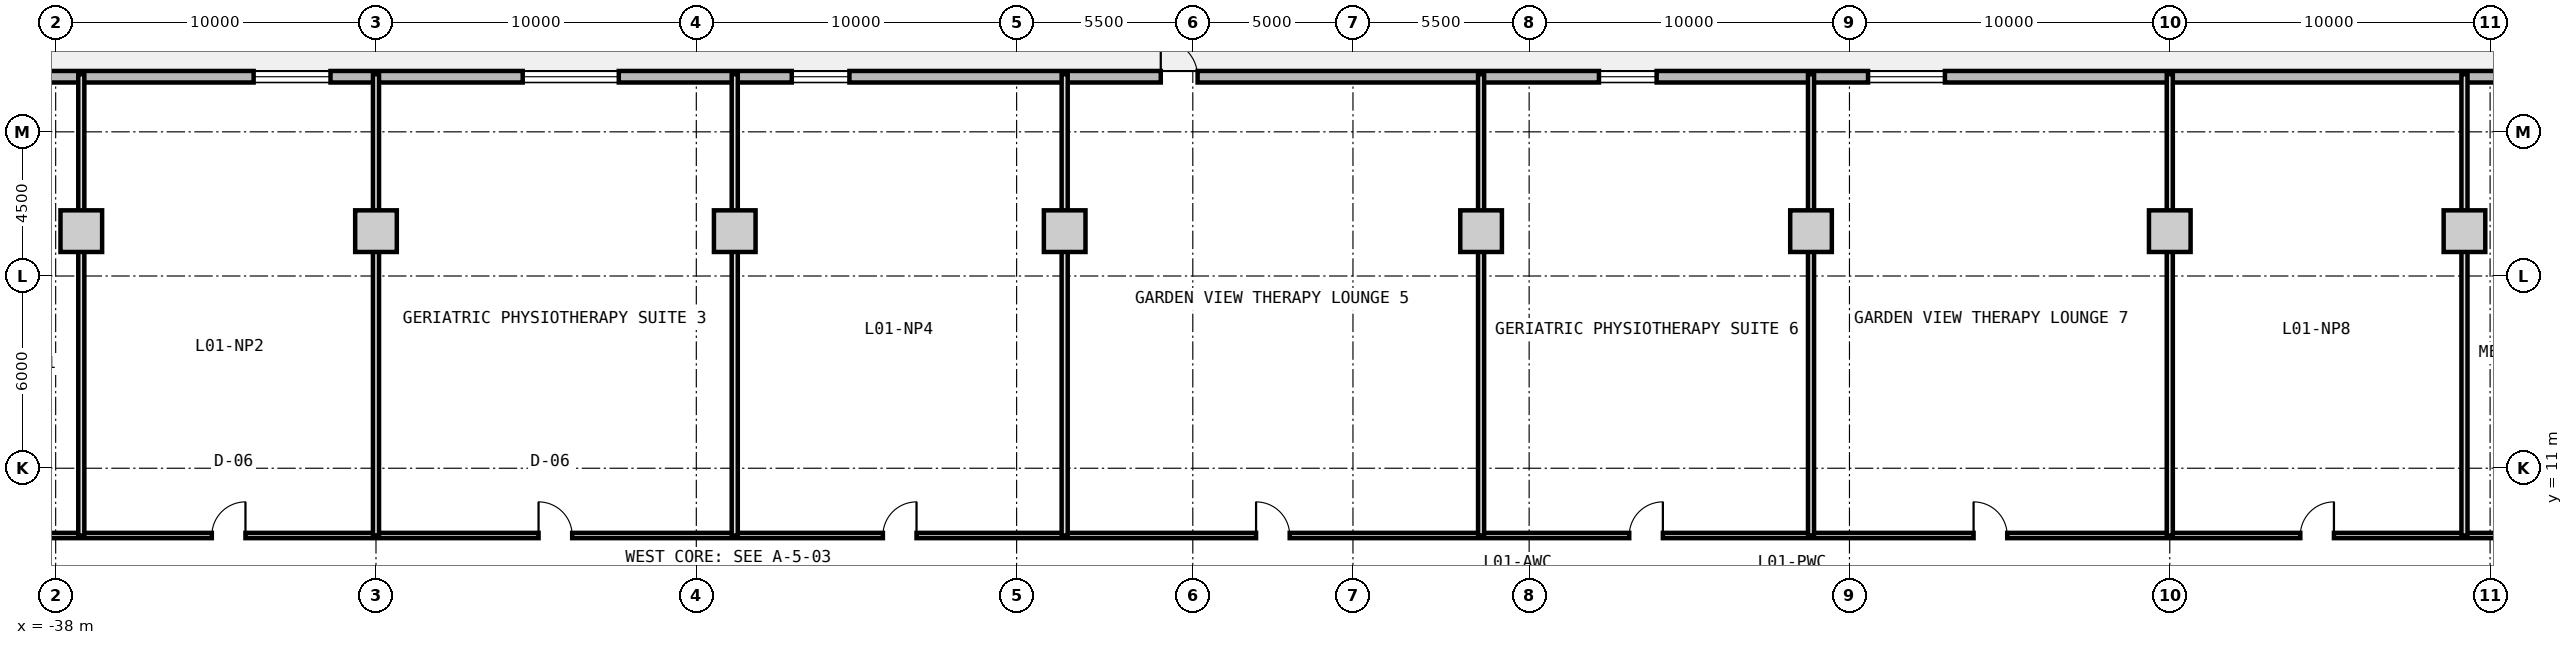
"""IFC4 building model, lengths in metres.
Left out: names, types, materials, properties, quantities, classifications, styles, units other than length and angle.
Written with IfcOpenShell. Run it as: python <this file> out.ifc"""

import sys

from ifc_helpers import new_model, si_unit, direction, frame, frame_2d, origin, origin_2d, place, context, subcontext, project, spatial, rectangle, extrude, source, transform, mapped, element, fill, save


model = new_model("IFC4")
c1 = context("Model", 3, precision=1e-05, world=origin(), true_north=direction((0.0, 1.0)))
c2 = subcontext(c1, "Body", "Model", "MODEL_VIEW")
j1 = project(units=[si_unit("LENGTHUNIT", "METRE"), si_unit("PLANEANGLEUNIT", "RADIAN")], contexts=[c1])
p1 = place(None, origin())
s1 = spatial("IfcSite", under=j1, at=p1, CompositionType="ELEMENT")
p2 = place(p1, origin())
s2 = spatial("IfcBuilding", under=s1, at=p2, CompositionType="ELEMENT")
p3 = place(p2, frame((0.0, 0.0, 4.2)))
s3 = spatial("IfcBuildingStorey", under=s2, at=p3, CompositionType="ELEMENT", Elevation=4.2)
m1 = source(origin(), c2, "Body", "SweptSolid", [
    extrude(rectangle(XDim=1.3, YDim=1.3, at=origin_2d()), origin(), (0.0, 0.0, 1.0), 4.2),
])
for number, where, z_axis, x_axis in (
    (1, (-37.2, 18.4, 0.0), (0.0, 0.0, 1.0), (1.0, 0.0, 0.0)),
    (2, (-28.0, 18.4, 0.0), (0.0, 0.0, 1.0), (1.0, 0.0, 0.0)),
    (3, (-16.8, 18.4, 0.0), (0.0, 0.0, 1.0), (1.0, 0.0, 0.0)),
    (4, (-6.5, 18.4, 0.0), (0.0, 0.0, 1.0), (1.0, 0.0, 0.0)),
    (5, (6.5, 18.4, 0.0), (0.0, 0.0, 1.0), (1.0, 0.0, 0.0)),
    (6, (16.8, 18.4, 0.0), (0.0, 0.0, 1.0), (1.0, 0.0, 0.0)),
    (7, (28.0, 18.4, 0.0), (0.0, 0.0, 1.0), (1.0, 0.0, 0.0)),
    (8, (37.2, 18.4, 0.0), (0.0, 0.0, 1.0), (1.0, 0.0, 0.0)),
):
    element("IfcColumn", number, at=place(p3, frame(where, z_axis=z_axis, x_axis=x_axis)), inside=s3, PredefinedType="COLUMN", context=c2, shape_type="MappedRepresentation", body=[
        mapped(m1, transform((0.0, 0.0, 0.0), x_axis=(1.0, 0.0, 0.0), y_axis=(0.0, 1.0, 0.0), z_axis=(0.0, 0.0, 1.0), scale=1.0)),
    ])
m2 = source(origin(), c2, "Body", "SweptSolid", [
    extrude(rectangle(XDim=105.24, YDim=0.36, at=frame_2d((52.62, 0.0))), origin(), (0.0, 0.0, 1.0), 3.88),
])
p4 = place(p3, frame((-52.62, 23.22, 0.0), z_axis=(0.0, 0.0, 1.0), x_axis=(1.0, 0.0, 0.0)))
e9 = element("IfcWall", 9, at=p4, inside=s3, PredefinedType="SOLIDWALL", context=c2, shape_type="MappedRepresentation", body=[
    mapped(m2, transform((0.0, 0.0, 0.0), x_axis=(1.0, 0.0, 0.0), y_axis=(0.0, 1.0, 0.0), z_axis=(0.0, 0.0, 1.0), scale=1.0)),
])
p5 = place(p4, frame((49.12, 0.0, 0.0)))
e10 = element("IfcOpeningElement", 10, at=p5, cuts=e9, PredefinedType="OPENING", context=c2, shape_type="SweptSolid", body=[
    extrude(rectangle(XDim=1.15, YDim=2.25, at=frame_2d((0.575, 1.125))), frame((0.0, 0.19, 0.0), z_axis=(0.0, -1.0, 0.0), x_axis=(1.0, 0.0, 0.0)), (0.0, 0.0, 1.0), 0.38),
])
p6 = place(p4, frame((4.0, 0.0, 0.85)))
e11 = element("IfcOpeningElement", 11, at=p6, cuts=e9, PredefinedType="OPENING", context=c2, shape_type="SweptSolid", body=[
    extrude(rectangle(XDim=3.0, YDim=2.1, at=frame_2d((1.5, 1.05))), frame((0.0, 0.19, 0.0), z_axis=(0.0, -1.0, 0.0), x_axis=(1.0, 0.0, 0.0)), (0.0, 0.0, 1.0), 0.38),
])
p7 = place(p4, frame((12.4, 0.0, 0.9)))
e12 = element("IfcOpeningElement", 12, at=p7, cuts=e9, PredefinedType="OPENING", context=c2, shape_type="SweptSolid", body=[
    extrude(rectangle(XDim=1.8, YDim=2.0, at=frame_2d((0.9, 1.0))), frame((0.0, 0.19, 0.0), z_axis=(0.0, -1.0, 0.0), x_axis=(1.0, 0.0, 0.0)), (0.0, 0.0, 1.0), 0.38),
])
p8 = place(p4, frame((20.8, 0.0, 0.85)))
e13 = element("IfcOpeningElement", 13, at=p8, cuts=e9, PredefinedType="OPENING", context=c2, shape_type="SweptSolid", body=[
    extrude(rectangle(XDim=2.4, YDim=2.2, at=frame_2d((1.2, 1.1))), frame((0.0, 0.19, 0.0), z_axis=(0.0, -1.0, 0.0), x_axis=(1.0, 0.0, 0.0)), (0.0, 0.0, 1.0), 0.38),
])
p9 = place(p4, frame((29.2, 0.0, 0.85)))
e14 = element("IfcOpeningElement", 14, at=p9, cuts=e9, PredefinedType="OPENING", context=c2, shape_type="SweptSolid", body=[
    extrude(rectangle(XDim=3.0, YDim=2.1, at=frame_2d((1.5, 1.05))), frame((0.0, 0.19, 0.0), z_axis=(0.0, -1.0, 0.0), x_axis=(1.0, 0.0, 0.0)), (0.0, 0.0, 1.0), 0.38),
])
p10 = place(p4, frame((37.6, 0.0, 0.9)))
e15 = element("IfcOpeningElement", 15, at=p10, cuts=e9, PredefinedType="OPENING", context=c2, shape_type="SweptSolid", body=[
    extrude(rectangle(XDim=1.8, YDim=2.0, at=frame_2d((0.9, 1.0))), frame((0.0, 0.19, 0.0), z_axis=(0.0, -1.0, 0.0), x_axis=(1.0, 0.0, 0.0)), (0.0, 0.0, 1.0), 0.38),
])
p11 = place(p4, frame((62.8, 0.0, 0.9)))
e16 = element("IfcOpeningElement", 16, at=p11, cuts=e9, PredefinedType="OPENING", context=c2, shape_type="SweptSolid", body=[
    extrude(rectangle(XDim=1.8, YDim=2.0, at=frame_2d((0.9, 1.0))), frame((0.0, 0.19, 0.0), z_axis=(0.0, -1.0, 0.0), x_axis=(1.0, 0.0, 0.0)), (0.0, 0.0, 1.0), 0.38),
])
p12 = place(p4, frame((71.2, 0.0, 0.85)))
e17 = element("IfcOpeningElement", 17, at=p12, cuts=e9, PredefinedType="OPENING", context=c2, shape_type="SweptSolid", body=[
    extrude(rectangle(XDim=2.4, YDim=2.2, at=frame_2d((1.2, 1.1))), frame((0.0, 0.19, 0.0), z_axis=(0.0, -1.0, 0.0), x_axis=(1.0, 0.0, 0.0)), (0.0, 0.0, 1.0), 0.38),
])
m3 = source(origin(), c2, "Body", "SweptSolid", [
    extrude(rectangle(XDim=105.3, YDim=0.165, at=frame_2d((52.65, 0.0))), origin(), (0.0, 0.0, 1.0), 3.865),
])
p13 = place(p3, frame((-52.65, 8.9, 0.0), z_axis=(0.0, 0.0, 1.0), x_axis=(1.0, 0.0, 0.0)))
e18 = element("IfcWall", 18, at=p13, inside=s3, PredefinedType="PARTITIONING", context=c2, shape_type="MappedRepresentation", body=[
    mapped(m3, transform((0.0, 0.0, 0.0), x_axis=(1.0, 0.0, 0.0), y_axis=(0.0, 1.0, 0.0), z_axis=(0.0, 0.0, 1.0), scale=1.0)),
])
p14 = place(p13, frame((7.325, 0.0, 0.0)))
e19 = element("IfcOpeningElement", 19, at=p14, cuts=e18, PredefinedType="OPENING", context=c2, shape_type="SweptSolid", body=[
    extrude(rectangle(XDim=1.05, YDim=2.15, at=frame_2d((0.525, 1.075))), frame((0.0, 0.093, 0.0), z_axis=(0.0, -1.0, 0.0), x_axis=(1.0, 0.0, 0.0)), (0.0, 0.0, 1.0), 0.185),
])
p15 = place(p13, frame((19.525, 0.0, 0.0)))
e20 = element("IfcOpeningElement", 20, at=p15, cuts=e18, PredefinedType="OPENING", context=c2, shape_type="SweptSolid", body=[
    extrude(rectangle(XDim=1.05, YDim=2.15, at=frame_2d((0.525, 1.075))), frame((0.0, 0.093, 0.0), z_axis=(0.0, -1.0, 0.0), x_axis=(1.0, 0.0, 0.0)), (0.0, 0.0, 1.0), 0.185),
])
p16 = place(p13, frame((29.725, 0.0, 0.0)))
e21 = element("IfcOpeningElement", 21, at=p16, cuts=e18, PredefinedType="OPENING", context=c2, shape_type="SweptSolid", body=[
    extrude(rectangle(XDim=1.05, YDim=2.15, at=frame_2d((0.525, 1.075))), frame((0.0, 0.093, 0.0), z_axis=(0.0, -1.0, 0.0), x_axis=(1.0, 0.0, 0.0)), (0.0, 0.0, 1.0), 0.185),
])
p17 = place(p13, frame((40.475, 0.0, 0.0)))
e22 = element("IfcOpeningElement", 22, at=p17, cuts=e18, PredefinedType="OPENING", context=c2, shape_type="SweptSolid", body=[
    extrude(rectangle(XDim=1.05, YDim=2.15, at=frame_2d((0.525, 1.075))), frame((0.0, 0.093, 0.0), z_axis=(0.0, -1.0, 0.0), x_axis=(1.0, 0.0, 0.0)), (0.0, 0.0, 1.0), 0.185),
])
p18 = place(p13, frame((52.125, 0.0, 0.0)))
e23 = element("IfcOpeningElement", 23, at=p18, cuts=e18, PredefinedType="OPENING", context=c2, shape_type="SweptSolid", body=[
    extrude(rectangle(XDim=1.05, YDim=2.15, at=frame_2d((0.525, 1.075))), frame((0.0, 0.093, 0.0), z_axis=(0.0, -1.0, 0.0), x_axis=(1.0, 0.0, 0.0)), (0.0, 0.0, 1.0), 0.185),
])
p19 = place(p13, frame((63.775, 0.0, 0.0)))
e24 = element("IfcOpeningElement", 24, at=p19, cuts=e18, PredefinedType="OPENING", context=c2, shape_type="SweptSolid", body=[
    extrude(rectangle(XDim=1.05, YDim=2.15, at=frame_2d((0.525, 1.075))), frame((0.0, 0.093, 0.0), z_axis=(0.0, -1.0, 0.0), x_axis=(1.0, 0.0, 0.0)), (0.0, 0.0, 1.0), 0.185),
])
p20 = place(p13, frame((74.525, 0.0, 0.0)))
e25 = element("IfcOpeningElement", 25, at=p20, cuts=e18, PredefinedType="OPENING", context=c2, shape_type="SweptSolid", body=[
    extrude(rectangle(XDim=1.05, YDim=2.15, at=frame_2d((0.525, 1.075))), frame((0.0, 0.093, 0.0), z_axis=(0.0, -1.0, 0.0), x_axis=(1.0, 0.0, 0.0)), (0.0, 0.0, 1.0), 0.185),
])
p21 = place(p13, frame((84.725, 0.0, 0.0)))
e26 = element("IfcOpeningElement", 26, at=p21, cuts=e18, PredefinedType="OPENING", context=c2, shape_type="SweptSolid", body=[
    extrude(rectangle(XDim=1.05, YDim=2.15, at=frame_2d((0.525, 1.075))), frame((0.0, 0.093, 0.0), z_axis=(0.0, -1.0, 0.0), x_axis=(1.0, 0.0, 0.0)), (0.0, 0.0, 1.0), 0.185),
])
p22 = place(p13, frame((96.925, 0.0, 0.0)))
e27 = element("IfcOpeningElement", 27, at=p22, cuts=e18, PredefinedType="OPENING", context=c2, shape_type="SweptSolid", body=[
    extrude(rectangle(XDim=1.05, YDim=2.15, at=frame_2d((0.525, 1.075))), frame((0.0, 0.093, 0.0), z_axis=(0.0, -1.0, 0.0), x_axis=(1.0, 0.0, 0.0)), (0.0, 0.0, 1.0), 0.185),
])
m4 = source(origin(), c2, "Body", "SweptSolid", [
    extrude(rectangle(XDim=14.4, YDim=0.19, at=frame_2d((7.2, 0.0))), origin(), (0.0, 0.0, 1.0), 3.865),
])
for number, where, z_axis, x_axis in (
    (28, (-37.2, 8.9, 0.0), (0.0, 0.0, 1.0), (0.0, 1.0, 0.0)),
    (29, (-28.0, 8.9, 0.0), (0.0, 0.0, 1.0), (0.0, 1.0, 0.0)),
    (30, (-16.8, 8.9, 0.0), (0.0, 0.0, 1.0), (0.0, 1.0, 0.0)),
):
    element("IfcWall", number, at=place(p3, frame(where, z_axis=z_axis, x_axis=x_axis)), inside=s3, PredefinedType="PARTITIONING", context=c2, shape_type="MappedRepresentation", body=[
        mapped(m4, transform((0.0, 0.0, 0.0), x_axis=(1.0, 0.0, 0.0), y_axis=(0.0, 1.0, 0.0), z_axis=(0.0, 0.0, 1.0), scale=1.0)),
    ])
m5 = source(origin(), c2, "Body", "SweptSolid", [
    extrude(rectangle(XDim=14.4, YDim=0.19, at=frame_2d((7.2, 0.0))), origin(), (0.0, 0.0, 1.0), 3.215),
])
for number, where, z_axis, x_axis in (
    (31, (-6.5, 8.9, 0.0), (0.0, 0.0, 1.0), (0.0, 1.0, 0.0)),
    (32, (6.5, 8.9, 0.0), (0.0, 0.0, 1.0), (0.0, 1.0, 0.0)),
    (33, (16.8, 8.9, 0.0), (0.0, 0.0, 1.0), (0.0, 1.0, 0.0)),
):
    element("IfcWall", number, at=place(p3, frame(where, z_axis=z_axis, x_axis=x_axis)), inside=s3, PredefinedType="PARTITIONING", context=c2, shape_type="MappedRepresentation", body=[
        mapped(m5, transform((0.0, 0.0, 0.0), x_axis=(1.0, 0.0, 0.0), y_axis=(0.0, 1.0, 0.0), z_axis=(0.0, 0.0, 1.0), scale=1.0)),
    ])
for number, where, z_axis, x_axis in (
    (34, (28.0, 8.9, 0.0), (0.0, 0.0, 1.0), (0.0, 1.0, 0.0)),
    (35, (37.2, 8.9, 0.0), (0.0, 0.0, 1.0), (0.0, 1.0, 0.0)),
):
    element("IfcWall", number, at=place(p3, frame(where, z_axis=z_axis, x_axis=x_axis)), inside=s3, PredefinedType="PARTITIONING", context=c2, shape_type="MappedRepresentation", body=[
        mapped(m4, transform((0.0, 0.0, 0.0), x_axis=(1.0, 0.0, 0.0), y_axis=(0.0, 1.0, 0.0), z_axis=(0.0, 0.0, 1.0), scale=1.0)),
    ])
m6 = source(origin(), c2, "Body", "SweptSolid", [
    extrude(rectangle(XDim=1.15, YDim=2.25, at=frame_2d((0.575, 1.125))), frame((0.0, 0.025, 0.0), z_axis=(0.0, -1.0, 0.0), x_axis=(1.0, 0.0, 0.0)), (0.0, 0.0, 1.0), 0.05),
])
p23 = place(p5, origin())
e36 = element("IfcDoor", 36, at=p23, inside=s3, OperationType="SINGLE_SWING_LEFT", PredefinedType="DOOR", context=c2, shape_type="MappedRepresentation", body=[
    mapped(m6, transform((0.0, 0.0, 0.0), x_axis=(1.0, 0.0, 0.0), y_axis=(0.0, 1.0, 0.0), z_axis=(0.0, 0.0, 1.0), scale=1.0)),
])
fill(e10, e36)
m7 = source(origin(), c2, "Body", "SweptSolid", [
    extrude(rectangle(XDim=2.4, YDim=2.2, at=frame_2d((1.2, 1.1))), frame((0.0, 0.03, 0.0), z_axis=(0.0, -1.0, 0.0), x_axis=(1.0, 0.0, 0.0)), (0.0, 0.0, 1.0), 0.06),
])
p24 = place(p8, origin())
e37 = element("IfcWindow", 37, at=p24, inside=s3, PartitioningType="SINGLE_PANEL", PredefinedType="WINDOW", context=c2, shape_type="MappedRepresentation", body=[
    mapped(m7, transform((0.0, 0.0, 0.0), x_axis=(1.0, 0.0, 0.0), y_axis=(0.0, 1.0, 0.0), z_axis=(0.0, 0.0, 1.0), scale=1.0)),
])
fill(e13, e37)
m8 = source(origin(), c2, "Body", "SweptSolid", [
    extrude(rectangle(XDim=3.0, YDim=2.1, at=frame_2d((1.5, 1.05))), frame((0.0, 0.03, 0.0), z_axis=(0.0, -1.0, 0.0), x_axis=(1.0, 0.0, 0.0)), (0.0, 0.0, 1.0), 0.06),
])
p25 = place(p9, origin())
e38 = element("IfcWindow", 38, at=p25, inside=s3, PartitioningType="SINGLE_PANEL", PredefinedType="WINDOW", context=c2, shape_type="MappedRepresentation", body=[
    mapped(m8, transform((0.0, 0.0, 0.0), x_axis=(1.0, 0.0, 0.0), y_axis=(0.0, 1.0, 0.0), z_axis=(0.0, 0.0, 1.0), scale=1.0)),
])
fill(e14, e38)
m9 = source(origin(), c2, "Body", "SweptSolid", [
    extrude(rectangle(XDim=1.8, YDim=2.0, at=frame_2d((0.9, 1.0))), frame((0.0, 0.03, 0.0), z_axis=(0.0, -1.0, 0.0), x_axis=(1.0, 0.0, 0.0)), (0.0, 0.0, 1.0), 0.06),
])
p26 = place(p10, origin())
e39 = element("IfcWindow", 39, at=p26, inside=s3, PartitioningType="SINGLE_PANEL", PredefinedType="WINDOW", context=c2, shape_type="MappedRepresentation", body=[
    mapped(m9, transform((0.0, 0.0, 0.0), x_axis=(1.0, 0.0, 0.0), y_axis=(0.0, 1.0, 0.0), z_axis=(0.0, 0.0, 1.0), scale=1.0)),
])
fill(e15, e39)
p27 = place(p11, origin())
e40 = element("IfcWindow", 40, at=p27, inside=s3, PartitioningType="SINGLE_PANEL", PredefinedType="WINDOW", context=c2, shape_type="MappedRepresentation", body=[
    mapped(m9, transform((0.0, 0.0, 0.0), x_axis=(1.0, 0.0, 0.0), y_axis=(0.0, 1.0, 0.0), z_axis=(0.0, 0.0, 1.0), scale=1.0)),
])
fill(e16, e40)
p28 = place(p12, origin())
e41 = element("IfcWindow", 41, at=p28, inside=s3, PartitioningType="SINGLE_PANEL", PredefinedType="WINDOW", context=c2, shape_type="MappedRepresentation", body=[
    mapped(m7, transform((0.0, 0.0, 0.0), x_axis=(1.0, 0.0, 0.0), y_axis=(0.0, 1.0, 0.0), z_axis=(0.0, 0.0, 1.0), scale=1.0)),
])
fill(e17, e41)
m10 = source(origin(), c2, "Body", "SweptSolid", [
    extrude(rectangle(XDim=1.05, YDim=2.15, at=frame_2d((0.525, 1.075))), frame((0.0, 0.025, 0.0), z_axis=(0.0, -1.0, 0.0), x_axis=(1.0, 0.0, 0.0)), (0.0, 0.0, 1.0), 0.05),
])
p29 = place(p15, origin())
e42 = element("IfcDoor", 42, at=p29, inside=s3, OperationType="SINGLE_SWING_RIGHT", PredefinedType="DOOR", context=c2, shape_type="MappedRepresentation", body=[
    mapped(m10, transform((0.0, 0.0, 0.0), x_axis=(1.0, 0.0, 0.0), y_axis=(0.0, 1.0, 0.0), z_axis=(0.0, 0.0, 1.0), scale=1.0)),
])
fill(e20, e42)
p30 = place(p16, origin())
e43 = element("IfcDoor", 43, at=p30, inside=s3, OperationType="SINGLE_SWING_LEFT", PredefinedType="DOOR", context=c2, shape_type="MappedRepresentation", body=[
    mapped(m10, transform((0.0, 0.0, 0.0), x_axis=(1.0, 0.0, 0.0), y_axis=(0.0, 1.0, 0.0), z_axis=(0.0, 0.0, 1.0), scale=1.0)),
])
fill(e21, e43)
p31 = place(p17, origin())
e44 = element("IfcDoor", 44, at=p31, inside=s3, OperationType="SINGLE_SWING_RIGHT", PredefinedType="DOOR", context=c2, shape_type="MappedRepresentation", body=[
    mapped(m10, transform((0.0, 0.0, 0.0), x_axis=(1.0, 0.0, 0.0), y_axis=(0.0, 1.0, 0.0), z_axis=(0.0, 0.0, 1.0), scale=1.0)),
])
fill(e22, e44)
p32 = place(p18, origin())
e45 = element("IfcDoor", 45, at=p32, inside=s3, OperationType="SINGLE_SWING_LEFT", PredefinedType="DOOR", context=c2, shape_type="MappedRepresentation", body=[
    mapped(m10, transform((0.0, 0.0, 0.0), x_axis=(1.0, 0.0, 0.0), y_axis=(0.0, 1.0, 0.0), z_axis=(0.0, 0.0, 1.0), scale=1.0)),
])
fill(e23, e45)
p33 = place(p19, origin())
e46 = element("IfcDoor", 46, at=p33, inside=s3, OperationType="SINGLE_SWING_RIGHT", PredefinedType="DOOR", context=c2, shape_type="MappedRepresentation", body=[
    mapped(m10, transform((0.0, 0.0, 0.0), x_axis=(1.0, 0.0, 0.0), y_axis=(0.0, 1.0, 0.0), z_axis=(0.0, 0.0, 1.0), scale=1.0)),
])
fill(e24, e46)
p34 = place(p20, origin())
e47 = element("IfcDoor", 47, at=p34, inside=s3, OperationType="SINGLE_SWING_LEFT", PredefinedType="DOOR", context=c2, shape_type="MappedRepresentation", body=[
    mapped(m10, transform((0.0, 0.0, 0.0), x_axis=(1.0, 0.0, 0.0), y_axis=(0.0, 1.0, 0.0), z_axis=(0.0, 0.0, 1.0), scale=1.0)),
])
fill(e25, e47)
p35 = place(p21, origin())
e48 = element("IfcDoor", 48, at=p35, inside=s3, OperationType="SINGLE_SWING_RIGHT", PredefinedType="DOOR", context=c2, shape_type="MappedRepresentation", body=[
    mapped(m10, transform((0.0, 0.0, 0.0), x_axis=(1.0, 0.0, 0.0), y_axis=(0.0, 1.0, 0.0), z_axis=(0.0, 0.0, 1.0), scale=1.0)),
])
fill(e26, e48)
save(model, sys.argv[1])
